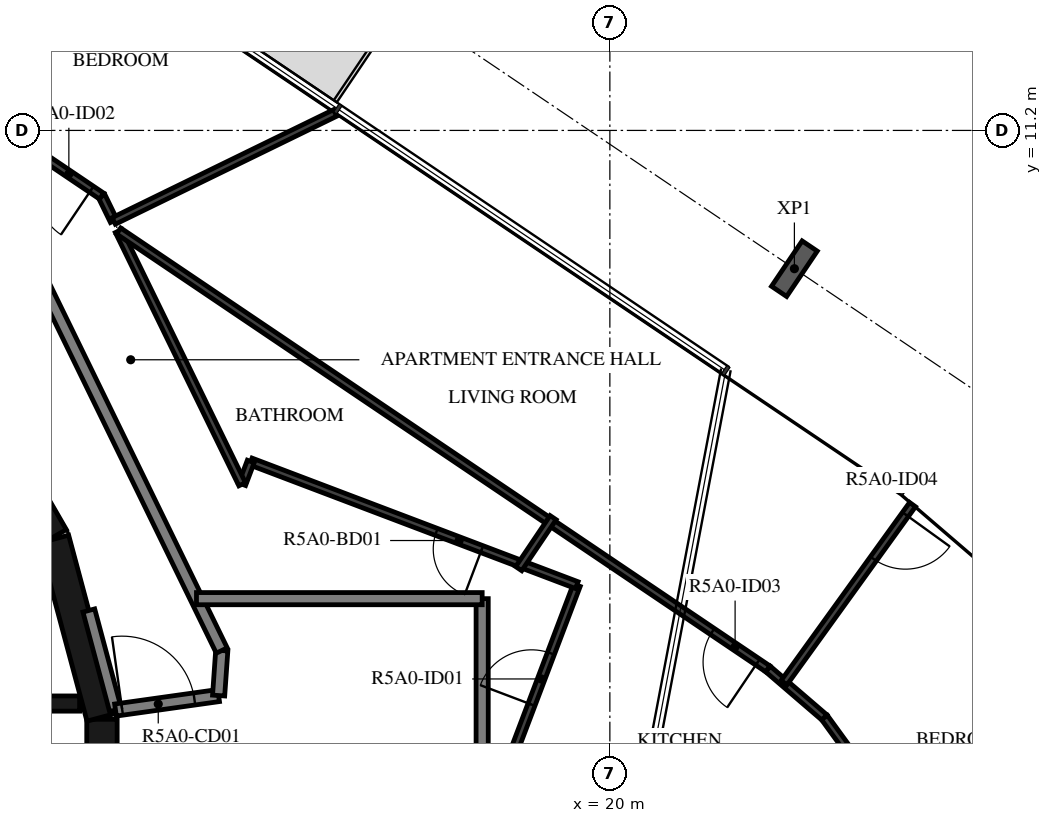
"""IFC4 building model, lengths in metres.
Left out: names, types, materials, properties, quantities, classifications, styles, units other than length and angle.
Written with IfcOpenShell. Run it as: python <this file> out.ifc"""

import sys

from ifc_helpers import new_model, si_unit, direction, frame, frame_2d, origin, origin_2d, place, context, subcontext, project, spatial, rectangle, i_section, extrude, element, fill, save


model = new_model("IFC4")
c1 = context("Model", 3, precision=1e-05, world=origin(), true_north=direction((0.0, 1.0)))
c2 = subcontext(c1, "Body", "Model", "MODEL_VIEW")
j1 = project(units=[si_unit("LENGTHUNIT", "METRE"), si_unit("PLANEANGLEUNIT", "RADIAN")], contexts=[c1])
p1 = place(None, origin())
s1 = spatial("IfcSite", under=j1, at=p1, CompositionType="ELEMENT")
p2 = place(p1, origin())
s2 = spatial("IfcBuilding", under=s1, at=p2, CompositionType="ELEMENT")
p3 = place(p2, frame((0.0, 0.0, 195.4)))
s3 = spatial("IfcBuildingStorey", under=s2, at=p3, CompositionType="ELEMENT", Elevation=195.4)
p4 = place(p3, frame((23.035, 8.926, -0.38), z_axis=(0.0, 0.0, 1.0), x_axis=(0.829037661466, -0.559192771654, 0.0)))
e1 = element("IfcColumn", 1, at=p4, inside=s3, PredefinedType="COLUMN", context=c2, shape_type="SweptSolid", body=[
    extrude(i_section(OverallWidth=0.3, OverallDepth=0.9, WebThickness=0.019, FlangeThickness=0.035, FilletRadius=0.03, at=origin_2d()), origin(), (0.0, 0.0, 1.0), 3.5),
])
p5 = place(p3, frame((11.647, -1.516, 0.0), z_axis=(0.0, 0.0, 1.0), x_axis=(0.0, 1.0, 0.0)))
e2 = element("IfcWall", 2, at=p5, inside=s3, PredefinedType="SHEAR", context=c2, shape_type="SweptSolid", body=[
    extrude(rectangle(XDim=3.033, YDim=0.5, at=frame_2d((1.516, 0.0))), origin(), (0.0, 0.0, 1.0), 3.12),
])
p6 = place(p5, frame((0.616, 0.0, 0.0)))
e3 = element("IfcOpeningElement", 3, at=p6, cuts=e2, PredefinedType="OPENING", context=c2, shape_type="SweptSolid", body=[
    extrude(rectangle(XDim=1.8, YDim=2.1, at=frame_2d((0.9, 1.05))), frame((0.0, 0.26, 0.0), z_axis=(0.0, -1.0, 0.0), x_axis=(1.0, 0.0, 0.0)), (0.0, 0.0, 1.0), 0.52),
])
for number, where, z_axis, x_axis in (
    (4, (11.643, 1.55, 0.0), (0.0, 0.0, 1.0), (-0.259, 0.966, 0.0)),
    (5, (10.845, 4.51, 0.0), (0.0, 0.0, 1.0), (-0.5, 0.866, 0.0)),
):
    element("IfcWall", number, at=place(p3, frame(where, z_axis=z_axis, x_axis=x_axis)), inside=s3, PredefinedType="SHEAR", context=c2, shape_type="SweptSolid", body=[
        extrude(rectangle(XDim=3.033, YDim=0.5, at=frame_2d((1.516, 0.0))), origin(), (0.0, 0.0, 1.0), 3.12),
    ])
p7 = place(p3, frame((3.35, 1.775, 0.0), z_axis=(0.0, 0.0, 1.0), x_axis=(1.0, 0.0, 0.0)))
e6 = element("IfcWall", 6, at=p7, inside=s3, PredefinedType="SHEAR", context=c2, shape_type="SweptSolid", body=[
    extrude(rectangle(XDim=7.93, YDim=0.25, at=frame_2d((3.965, 0.0))), origin(), (0.0, 0.0, 1.0), 3.12),
])
p8 = place(p7, frame((0.35, 0.0, 0.0)))
e7 = element("IfcOpeningElement", 7, at=p8, cuts=e6, PredefinedType="OPENING", context=c2, shape_type="SweptSolid", body=[
    extrude(rectangle(XDim=1.2, YDim=2.4, at=frame_2d((0.6, 1.2))), frame((0.0, 0.135, 0.0), z_axis=(0.0, -1.0, 0.0), x_axis=(1.0, 0.0, 0.0)), (0.0, 0.0, 1.0), 0.27),
])
p9 = place(p7, frame((2.5, 0.0, 0.0)))
e8 = element("IfcOpeningElement", 8, at=p9, cuts=e6, PredefinedType="OPENING", context=c2, shape_type="SweptSolid", body=[
    extrude(rectangle(XDim=1.2, YDim=2.4, at=frame_2d((0.6, 1.2))), frame((0.0, 0.135, 0.0), z_axis=(0.0, -1.0, 0.0), x_axis=(1.0, 0.0, 0.0)), (0.0, 0.0, 1.0), 0.27),
])
p10 = place(p7, frame((4.8, 0.0, 0.0)))
e9 = element("IfcOpeningElement", 9, at=p10, cuts=e6, PredefinedType="OPENING", context=c2, shape_type="SweptSolid", body=[
    extrude(rectangle(XDim=0.9, YDim=2.1, at=frame_2d((0.45, 1.05))), frame((0.0, 0.135, 0.0), z_axis=(0.0, -1.0, 0.0), x_axis=(1.0, 0.0, 0.0)), (0.0, 0.0, 1.0), 0.27),
])
p11 = place(p3, frame((11.87, 1.668, 0.0), z_axis=(0.0, 0.0, 1.0), x_axis=(-0.258836880648, 0.965921047093, 0.0)))
e10 = element("IfcWall", 10, at=p11, inside=s3, PredefinedType="STANDARD", context=c2, shape_type="SweptSolid", body=[
    extrude(rectangle(XDim=1.695, YDim=0.2, at=frame_2d((0.848, 0.0))), origin(), (0.0, 0.0, 1.0), 3.12),
])
p12 = place(p3, frame((11.87, 1.668, 0.0), z_axis=(0.0, 0.0, 1.0), x_axis=(0.990271931984, 0.139145609792, 0.0)))
e11 = element("IfcWall", 11, at=p12, inside=s3, PredefinedType="STANDARD", context=c2, shape_type="SweptSolid", body=[
    extrude(rectangle(XDim=1.712, YDim=0.2, at=frame_2d((0.856, 0.0))), origin(), (0.0, 0.0, 1.0), 3.12),
])
p13 = place(p12, frame((0.11, 0.0, 0.0)))
e12 = element("IfcOpeningElement", 12, at=p13, cuts=e11, PredefinedType="OPENING", context=c2, shape_type="SweptSolid", body=[
    extrude(rectangle(XDim=1.2, YDim=2.1, at=frame_2d((0.6, 1.05))), frame((0.0, 0.11, 0.0), z_axis=(0.0, -1.0, 0.0), x_axis=(1.0, 0.0, 0.0)), (0.0, 0.0, 1.0), 0.22),
])
p14 = place(p3, frame((13.566, 1.906, 0.0), z_axis=(0.0, 0.0, 1.0), x_axis=(0.07005495793, 0.997543133338, 0.0)))
e13 = element("IfcWall", 13, at=p14, inside=s3, PredefinedType="STANDARD", context=c2, shape_type="SweptSolid", body=[
    extrude(rectangle(XDim=0.742, YDim=0.2, at=frame_2d((0.371, 0.0))), origin(), (0.0, 0.0, 1.0), 3.12),
])
p15 = place(p3, frame((13.618, 2.647, 0.0), z_axis=(0.0, 0.0, 1.0), x_axis=(-0.438366026218, 0.898796543751, 0.0)))
e14 = element("IfcWall", 14, at=p15, inside=s3, PredefinedType="STANDARD", context=c2, shape_type="SweptSolid", body=[
    extrude(rectangle(XDim=7.181, YDim=0.2, at=frame_2d((3.591, 0.0))), origin(), (0.0, 0.0, 1.0), 3.12),
])
p16 = place(p3, frame((17.9, -3.5, 0.0), z_axis=(0.0, 0.0, 1.0), x_axis=(0.0, 1.0, 0.0)))
e15 = element("IfcWall", 15, at=p16, inside=s3, PredefinedType="STANDARD", context=c2, shape_type="SweptSolid", body=[
    extrude(rectangle(XDim=7.0, YDim=0.2, at=frame_2d((3.5, 0.0))), origin(), (0.0, 0.0, 1.0), 3.12),
])
p17 = place(p3, frame((17.9, 3.5, 0.0), z_axis=(0.0, 0.0, 1.0), x_axis=(-1.0, 0.0, 0.0)))
e16 = element("IfcWall", 16, at=p17, inside=s3, PredefinedType="STANDARD", context=c2, shape_type="SweptSolid", body=[
    extrude(rectangle(XDim=4.698, YDim=0.2, at=frame_2d((2.349, 0.0))), origin(), (0.0, 0.0, 1.0), 3.12),
])
p18 = place(p3, frame((18.286, 0.637, 0.0), z_axis=(0.0, 0.0, 1.0), x_axis=(0.354672075988, 0.934990758518, 0.0)))
e17 = element("IfcWall", 17, at=p18, inside=s3, PredefinedType="PARTITIONING", context=c2, shape_type="SweptSolid", body=[
    extrude(rectangle(XDim=3.3, YDim=0.12, at=frame_2d((1.65, 0.0))), origin(), (0.0, 0.0, 1.0), 3.12),
])
p19 = place(p18, frame((1.2, 0.0, 0.0)))
e18 = element("IfcOpeningElement", 18, at=p19, cuts=e17, PredefinedType="OPENING", context=c2, shape_type="SweptSolid", body=[
    extrude(rectangle(XDim=0.9, YDim=2.1, at=frame_2d((0.45, 1.05))), frame((0.0, 0.07, 0.0), z_axis=(0.0, -1.0, 0.0), x_axis=(1.0, 0.0, 0.0)), (0.0, 0.0, 1.0), 0.14),
])
p20 = place(p3, frame((19.456, 3.722, 0.0), z_axis=(0.0, 0.0, 1.0), x_axis=(-0.935017484321, 0.3546016131, 0.0)))
e19 = element("IfcWall", 19, at=p20, inside=s3, PredefinedType="PARTITIONING", context=c2, shape_type="SweptSolid", body=[
    extrude(rectangle(XDim=5.734, YDim=0.12, at=frame_2d((2.867, 0.0))), origin(), (0.0, 0.0, 1.0), 3.12),
])
p21 = place(p20, frame((1.669, 0.0, 0.0)))
e20 = element("IfcOpeningElement", 20, at=p21, cuts=e19, PredefinedType="OPENING", context=c2, shape_type="SweptSolid", body=[
    extrude(rectangle(XDim=0.8, YDim=2.1, at=frame_2d((0.4, 1.05))), frame((0.0, 0.07, 0.0), z_axis=(0.0, -1.0, 0.0), x_axis=(1.0, 0.0, 0.0)), (0.0, 0.0, 1.0), 0.14),
])
p22 = place(p3, frame((14.094, 5.756, 0.0), z_axis=(0.0, 0.0, 1.0), x_axis=(-0.354267529254, -0.935144116014, 0.0)))
e21 = element("IfcWall", 21, at=p22, inside=s3, PredefinedType="PARTITIONING", context=c2, shape_type="SweptSolid", body=[
    extrude(rectangle(XDim=0.4, YDim=0.12, at=frame_2d((0.2, 0.0))), origin(), (0.0, 0.0, 1.0), 3.12),
])
p23 = place(p3, frame((13.953, 5.382, 0.0), z_axis=(0.0, 0.0, 1.0), x_axis=(-0.438382107355, 0.898788700391, 0.0)))
e22 = element("IfcWall", 22, at=p23, inside=s3, PredefinedType="PARTITIONING", context=c2, shape_type="SweptSolid", body=[
    extrude(rectangle(XDim=4.634, YDim=0.12, at=frame_2d((2.317, 0.0))), origin(), (0.0, 0.0, 1.0), 3.12),
])
p24 = place(p3, frame((11.841, 9.712, 0.0), z_axis=(0.0, 0.0, 1.0), x_axis=(-0.438381293215, 0.898789097486, 0.0)))
e23 = element("IfcWall", 23, at=p24, inside=s3, PredefinedType="PARTITIONING", context=c2, shape_type="SweptSolid", body=[
    extrude(rectangle(XDim=0.454, YDim=0.12, at=frame_2d((0.227, 0.0))), origin(), (0.0, 0.0, 1.0), 3.12),
])
p25 = place(p3, frame((11.642, 10.12, 0.0), z_axis=(0.0, 0.0, 1.0), x_axis=(-0.829032241779, 0.55920080659, 0.0)))
e24 = element("IfcWall", 24, at=p25, inside=s3, PredefinedType="PARTITIONING", context=c2, shape_type="SweptSolid", body=[
    extrude(rectangle(XDim=7.985, YDim=0.12, at=frame_2d((3.992, 0.0))), origin(), (0.0, 0.0, 1.0), 3.12),
])
p26 = place(p25, frame((0.2, 0.0, 0.0)))
e25 = element("IfcOpeningElement", 25, at=p26, cuts=e24, PredefinedType="OPENING", context=c2, shape_type="SweptSolid", body=[
    extrude(rectangle(XDim=0.9, YDim=2.1, at=frame_2d((0.45, 1.05))), frame((0.0, 0.07, 0.0), z_axis=(0.0, -1.0, 0.0), x_axis=(1.0, 0.0, 0.0)), (0.0, 0.0, 1.0), 0.14),
])
p27 = place(p25, frame((5.475, 0.0, 0.0)))
e26 = element("IfcOpeningElement", 26, at=p27, cuts=e24, PredefinedType="OPENING", context=c2, shape_type="SweptSolid", body=[
    extrude(rectangle(XDim=0.9, YDim=2.1, at=frame_2d((0.45, 1.05))), frame((0.0, 0.07, 0.0), z_axis=(0.0, -1.0, 0.0), x_axis=(1.0, 0.0, 0.0)), (0.0, 0.0, 1.0), 0.14),
])
p28 = place(p3, frame((22.598, 2.345, 0.0), z_axis=(0.0, 0.0, 1.0), x_axis=(0.758596166141, -0.651561092083, 0.0)))
e27 = element("IfcWall", 27, at=p28, inside=s3, PredefinedType="PARTITIONING", context=c2, shape_type="SweptSolid", body=[
    extrude(rectangle(XDim=1.227, YDim=0.12, at=frame_2d((0.614, 0.0))), origin(), (0.0, 0.0, 1.0), 3.12),
])
p29 = place(p3, frame((23.529, 1.545, 0.0), z_axis=(0.0, 0.0, 1.0), x_axis=(0.587742994292, -0.809047694923, 0.0)))
e28 = element("IfcWall", 28, at=p29, inside=s3, PredefinedType="PARTITIONING", context=c2, shape_type="SweptSolid", body=[
    extrude(rectangle(XDim=1.016, YDim=0.12, at=frame_2d((0.508, 0.0))), origin(), (0.0, 0.0, 1.0), 3.12),
])
p30 = place(p3, frame((24.978, 5.047, 0.0), z_axis=(0.0, 0.0, 1.0), x_axis=(-0.585041443684, -0.811003396523, 0.0)))
e29 = element("IfcWall", 29, at=p30, inside=s3, PredefinedType="PARTITIONING", context=c2, shape_type="SweptSolid", body=[
    extrude(rectangle(XDim=3.613, YDim=0.12, at=frame_2d((1.807, 0.0))), origin(), (0.0, 0.0, 1.0), 3.12),
])
p31 = place(p30, frame((0.2, 0.0, 0.0)))
e30 = element("IfcOpeningElement", 30, at=p31, cuts=e29, PredefinedType="OPENING", context=c2, shape_type="SweptSolid", body=[
    extrude(rectangle(XDim=0.9, YDim=2.1, at=frame_2d((0.45, 1.05))), frame((0.0, 0.07, 0.0), z_axis=(0.0, -1.0, 0.0), x_axis=(1.0, 0.0, 0.0)), (0.0, 0.0, 1.0), 0.14),
])
p32 = place(p3, frame((22.598, 2.345, 0.0), z_axis=(0.0, 0.0, 1.0), x_axis=(-0.829034113947, 0.559198031034, 0.0)))
e31 = element("IfcWall", 31, at=p32, inside=s3, PredefinedType="PARTITIONING", context=c2, shape_type="SweptSolid", body=[
    extrude(rectangle(XDim=12.879, YDim=0.12, at=frame_2d((6.439, 0.0))), origin(), (0.0, 0.0, 1.0), 3.12),
])
p33 = place(p32, frame((0.2, 0.0, 0.0)))
e32 = element("IfcOpeningElement", 32, at=p33, cuts=e31, PredefinedType="OPENING", context=c2, shape_type="SweptSolid", body=[
    extrude(rectangle(XDim=0.9, YDim=2.1, at=frame_2d((0.45, 1.05))), frame((0.0, 0.07, 0.0), z_axis=(0.0, -1.0, 0.0), x_axis=(1.0, 0.0, 0.0)), (0.0, 0.0, 1.0), 0.14),
])
p34 = place(p3, frame((19.067, 4.832, 0.0), z_axis=(0.0, 0.0, 1.0), x_axis=(-0.559257363459, -0.828994090098, 0.0)))
e33 = element("IfcWall", 33, at=p34, inside=s3, PredefinedType="PARTITIONING", context=c2, shape_type="SweptSolid", body=[
    extrude(rectangle(XDim=1.012, YDim=0.12, at=frame_2d((0.506, 0.0))), origin(), (0.0, 0.0, 1.0), 3.12),
])
p35 = place(p3, frame((15.482, 11.487, 0.0), z_axis=(0.0, 0.0, 1.0), x_axis=(-0.898807251285, -0.438344071521, 0.0)))
e34 = element("IfcWall", 34, at=p35, inside=s3, PredefinedType="PARTITIONING", context=c2, shape_type="SweptSolid", body=[
    extrude(rectangle(XDim=4.051, YDim=0.12, at=frame_2d((2.025, 0.0))), origin(), (0.0, 0.0, 1.0), 3.12),
])
p36 = place(p19, origin())
e35 = element("IfcDoor", 35, at=p36, inside=s3, OperationType="SINGLE_SWING_LEFT", PredefinedType="DOOR", context=c2, shape_type="SweptSolid", body=[
    extrude(rectangle(XDim=0.9, YDim=2.1, at=frame_2d((0.45, 1.05))), frame((0.0, 0.025, 0.0), z_axis=(0.0, -1.0, 0.0), x_axis=(1.0, 0.0, 0.0)), (0.0, 0.0, 1.0), 0.05),
])
fill(e18, e35)
p37 = place(p21, origin())
e36 = element("IfcDoor", 36, at=p37, inside=s3, OperationType="SINGLE_SWING_LEFT", PredefinedType="DOOR", context=c2, shape_type="SweptSolid", body=[
    extrude(rectangle(XDim=0.8, YDim=2.1, at=frame_2d((0.4, 1.05))), frame((0.0, 0.025, 0.0), z_axis=(0.0, -1.0, 0.0), x_axis=(1.0, 0.0, 0.0)), (0.0, 0.0, 1.0), 0.05),
])
fill(e20, e36)
p38 = place(p26, origin())
e37 = element("IfcDoor", 37, at=p38, inside=s3, OperationType="SINGLE_SWING_LEFT", PredefinedType="DOOR", context=c2, shape_type="SweptSolid", body=[
    extrude(rectangle(XDim=0.9, YDim=2.1, at=frame_2d((0.45, 1.05))), frame((0.0, 0.025, 0.0), z_axis=(0.0, -1.0, 0.0), x_axis=(1.0, 0.0, 0.0)), (0.0, 0.0, 1.0), 0.05),
])
fill(e25, e37)
p39 = place(p33, origin())
e38 = element("IfcDoor", 38, at=p39, inside=s3, OperationType="SINGLE_SWING_LEFT", PredefinedType="DOOR", context=c2, shape_type="SweptSolid", body=[
    extrude(rectangle(XDim=0.9, YDim=2.1, at=frame_2d((0.45, 1.05))), frame((0.0, 0.025, 0.0), z_axis=(0.0, -1.0, 0.0), x_axis=(1.0, 0.0, 0.0)), (0.0, 0.0, 1.0), 0.05),
])
fill(e32, e38)
p40 = place(p31, origin())
e39 = element("IfcDoor", 39, at=p40, inside=s3, OperationType="SINGLE_SWING_LEFT", PredefinedType="DOOR", context=c2, shape_type="SweptSolid", body=[
    extrude(rectangle(XDim=0.9, YDim=2.1, at=frame_2d((0.45, 1.05))), frame((0.0, 0.025, 0.0), z_axis=(0.0, -1.0, 0.0), x_axis=(1.0, 0.0, 0.0)), (0.0, 0.0, 1.0), 0.05),
])
fill(e30, e39)
p41 = place(p13, origin())
e40 = element("IfcDoor", 40, at=p41, inside=s3, OperationType="DOUBLE_DOOR_SINGLE_SWING", PredefinedType="DOOR", context=c2, shape_type="SweptSolid", body=[
    extrude(rectangle(XDim=1.2, YDim=2.1, at=frame_2d((0.6, 1.05))), frame((0.0, 0.025, 0.0), z_axis=(0.0, -1.0, 0.0), x_axis=(1.0, 0.0, 0.0)), (0.0, 0.0, 1.0), 0.05),
])
fill(e12, e40)
save(model, sys.argv[1])
